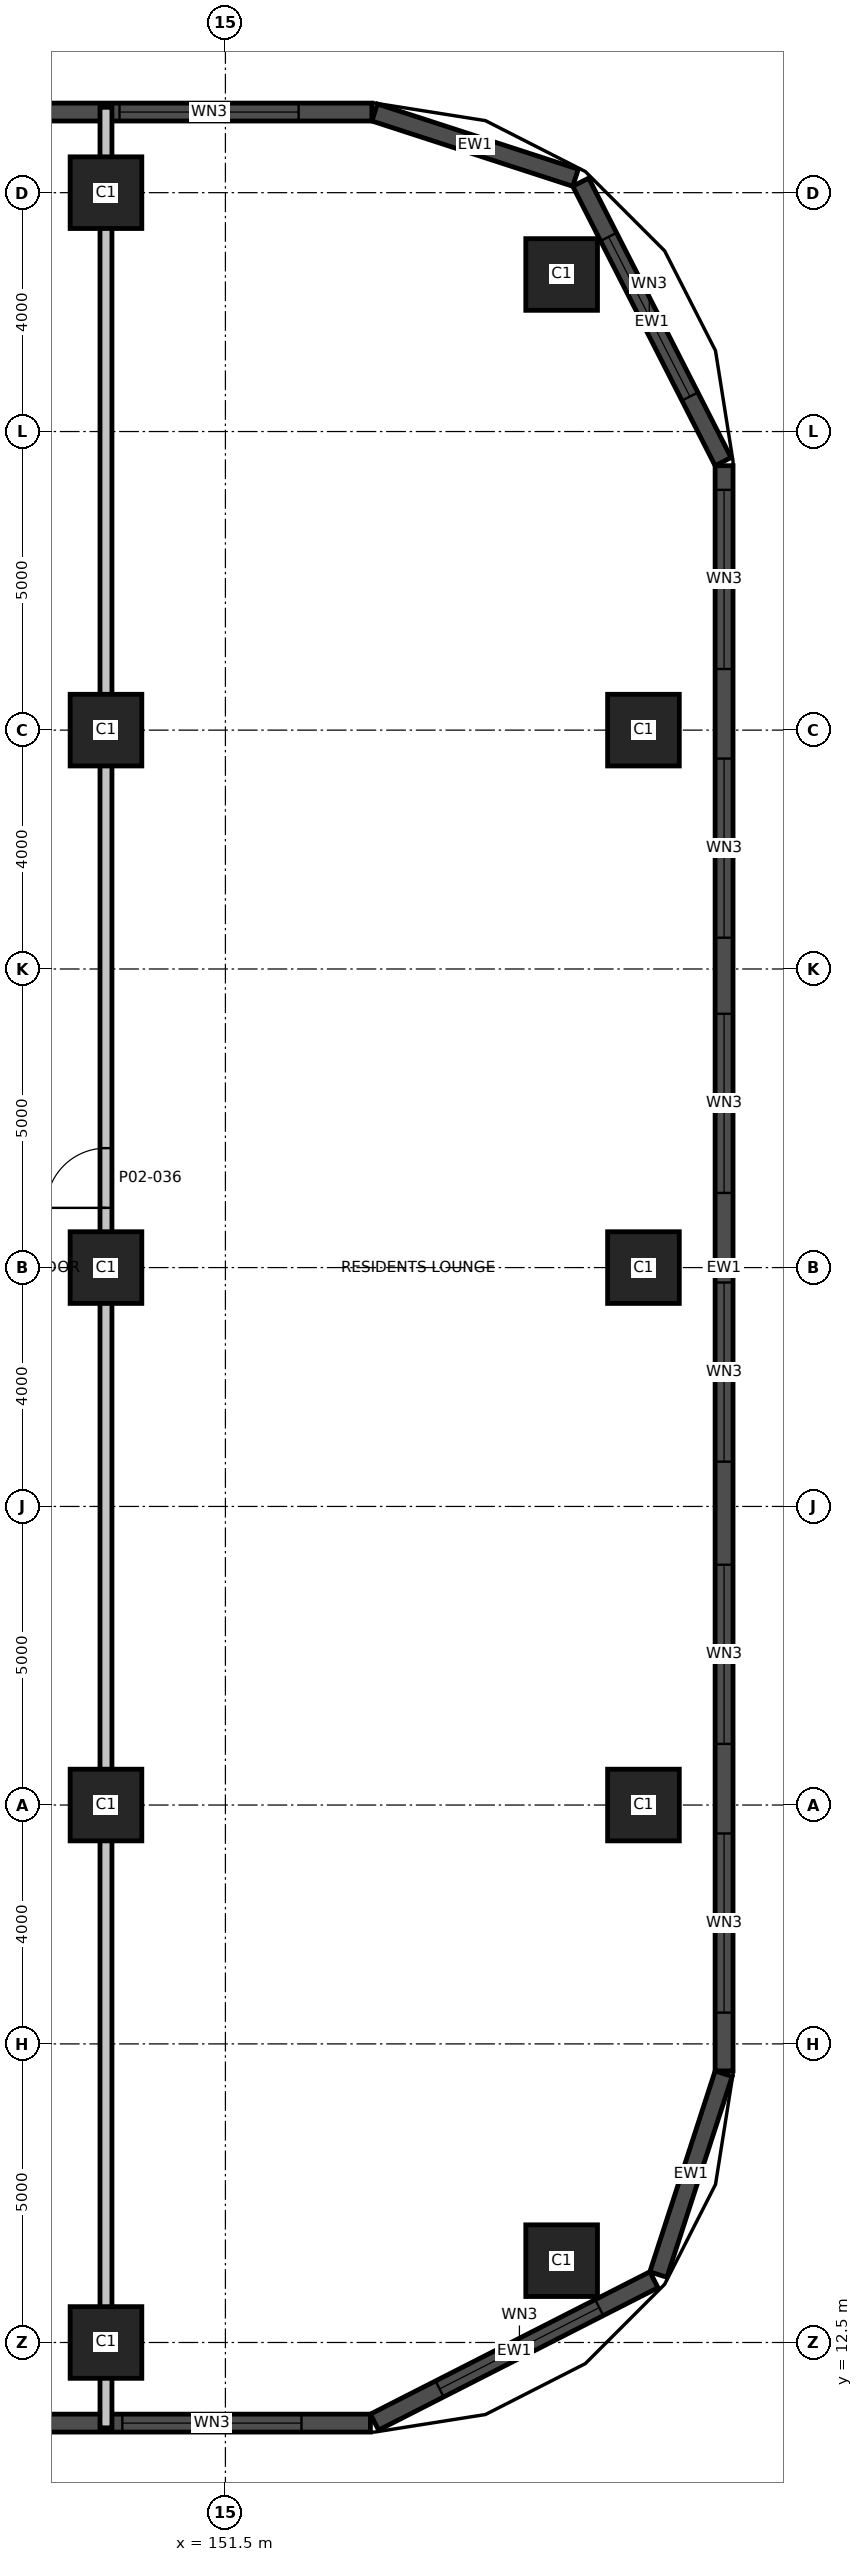
"""IFC4 building model, lengths in metres.
Left out: names, types, materials, properties, quantities, classifications, styles, units other than length and angle.
Written with IfcOpenShell. Run it as: python <this file> out.ifc"""

import sys

from ifc_helpers import new_model, si_unit, direction, frame, frame_2d, origin, origin_2d, place, context, subcontext, project, spatial, rectangle, extrude, element, fill, save


model = new_model("IFC4")
c1 = context("Model", 3, precision=1e-05, world=origin(), true_north=direction((0.0, 1.0)))
c2 = subcontext(c1, "Body", "Model", "MODEL_VIEW")
j1 = project(units=[si_unit("LENGTHUNIT", "METRE"), si_unit("PLANEANGLEUNIT", "RADIAN")], contexts=[c1])
p1 = place(None, origin())
s1 = spatial("IfcSite", under=j1, at=p1, CompositionType="ELEMENT")
p2 = place(p1, origin())
s2 = spatial("IfcBuilding", under=s1, at=p2, CompositionType="ELEMENT")
p3 = place(p2, frame((0.0, 0.0, 13.5)))
s3 = spatial("IfcBuildingStorey", under=s2, at=p3, CompositionType="ELEMENT", Elevation=13.5)
for number, where, z_axis, x_axis in (
    (1, (149.5, 12.5, 0.0), (0.0, 0.0, 1.0), (1.0, 0.0, 0.0)),
    (2, (157.13, 13.87, 0.0), (0.0, 0.0, 1.0), (1.0, 0.0, 0.0)),
    (3, (149.5, 21.5, 0.0), (0.0, 0.0, 1.0), (1.0, 0.0, 0.0)),
    (4, (158.5, 21.5, 0.0), (0.0, 0.0, 1.0), (1.0, 0.0, 0.0)),
    (5, (149.5, 30.5, 0.0), (0.0, 0.0, 1.0), (1.0, 0.0, 0.0)),
    (6, (158.5, 30.5, 0.0), (0.0, 0.0, 1.0), (1.0, 0.0, 0.0)),
    (7, (149.5, 39.5, 0.0), (0.0, 0.0, 1.0), (1.0, 0.0, 0.0)),
    (8, (158.5, 39.5, 0.0), (0.0, 0.0, 1.0), (1.0, 0.0, 0.0)),
    (9, (157.13, 47.13, 0.0), (0.0, 0.0, 1.0), (1.0, 0.0, 0.0)),
    (10, (149.5, 48.5, 0.0), (0.0, 0.0, 1.0), (1.0, 0.0, 0.0)),
):
    element("IfcColumn", number, at=place(p3, frame(where, z_axis=z_axis, x_axis=x_axis)), inside=s3, PredefinedType="COLUMN", context=c2, shape_type="SweptSolid", body=[
        extrude(rectangle(XDim=1.2, YDim=1.2, at=origin_2d()), origin(), (0.0, 0.0, 1.0), 5.0),
    ])
p4 = place(p3, frame((118.048, 11.15, 0.0), z_axis=(0.0, 0.0, 1.0), x_axis=(1.0, 0.0, 0.0)))
e11 = element("IfcWall", 11, at=p4, inside=s3, PredefinedType="SOLIDWALL", context=c2, shape_type="SweptSolid", body=[
    extrude(rectangle(XDim=35.88, YDim=0.3, at=frame_2d((17.94, 0.0))), origin(), (0.0, 0.0, 1.0), 4.7),
])
p5 = place(p4, frame((4.202, 0.0, 0.9)))
e12 = element("IfcOpeningElement", 12, at=p5, cuts=e11, PredefinedType="OPENING", context=c2, shape_type="SweptSolid", body=[
    extrude(rectangle(XDim=3.0, YDim=2.4, at=frame_2d((1.5, 1.2))), frame((0.0, 0.16, 0.0), z_axis=(0.0, -1.0, 0.0), x_axis=(1.0, 0.0, 0.0)), (0.0, 0.0, 1.0), 0.32),
])
p6 = place(p4, frame((8.702, 0.0, 0.9)))
e13 = element("IfcOpeningElement", 13, at=p6, cuts=e11, PredefinedType="OPENING", context=c2, shape_type="SweptSolid", body=[
    extrude(rectangle(XDim=3.0, YDim=2.4, at=frame_2d((1.5, 1.2))), frame((0.0, 0.16, 0.0), z_axis=(0.0, -1.0, 0.0), x_axis=(1.0, 0.0, 0.0)), (0.0, 0.0, 1.0), 0.32),
])
p7 = place(p4, frame((13.202, 0.0, 0.9)))
e14 = element("IfcOpeningElement", 14, at=p7, cuts=e11, PredefinedType="OPENING", context=c2, shape_type="SweptSolid", body=[
    extrude(rectangle(XDim=3.0, YDim=2.4, at=frame_2d((1.5, 1.2))), frame((0.0, 0.16, 0.0), z_axis=(0.0, -1.0, 0.0), x_axis=(1.0, 0.0, 0.0)), (0.0, 0.0, 1.0), 0.32),
])
p8 = place(p4, frame((22.202, 0.0, 0.9)))
e15 = element("IfcOpeningElement", 15, at=p8, cuts=e11, PredefinedType="OPENING", context=c2, shape_type="SweptSolid", body=[
    extrude(rectangle(XDim=3.0, YDim=2.4, at=frame_2d((1.5, 1.2))), frame((0.0, 0.16, 0.0), z_axis=(0.0, -1.0, 0.0), x_axis=(1.0, 0.0, 0.0)), (0.0, 0.0, 1.0), 0.32),
])
p9 = place(p4, frame((31.726, 0.0, 0.9)))
e16 = element("IfcOpeningElement", 16, at=p9, cuts=e11, PredefinedType="OPENING", context=c2, shape_type="SweptSolid", body=[
    extrude(rectangle(XDim=3.0, YDim=2.4, at=frame_2d((1.5, 1.2))), frame((0.0, 0.16, 0.0), z_axis=(0.0, -1.0, 0.0), x_axis=(1.0, 0.0, 0.0)), (0.0, 0.0, 1.0), 0.32),
])
p10 = place(p3, frame((153.996, 11.166, 0.0), z_axis=(0.0, 0.0, 1.0), x_axis=(0.890998339455, 0.454006562826, 0.0)))
e17 = element("IfcWall", 17, at=p10, inside=s3, PredefinedType="SOLIDWALL", context=c2, shape_type="SweptSolid", body=[
    extrude(rectangle(XDim=5.252, YDim=0.3, at=frame_2d((2.626, 0.0))), origin(), (0.0, 0.0, 1.0), 4.7),
])
p11 = place(p10, frame((1.224, 0.0, 0.9)))
e18 = element("IfcOpeningElement", 18, at=p11, cuts=e17, PredefinedType="OPENING", context=c2, shape_type="SweptSolid", body=[
    extrude(rectangle(XDim=3.0, YDim=2.4, at=frame_2d((1.5, 1.2))), frame((0.0, 0.16, 0.0), z_axis=(0.0, -1.0, 0.0), x_axis=(1.0, 0.0, 0.0)), (0.0, 0.0, 1.0), 0.32),
])
p12 = place(p3, frame((158.75, 13.638, 0.0), z_axis=(0.0, 0.0, 1.0), x_axis=(0.309073584194, 0.951038127287, 0.0)))
e19 = element("IfcWall", 19, at=p12, inside=s3, PredefinedType="SOLIDWALL", context=c2, shape_type="SweptSolid", body=[
    extrude(rectangle(XDim=3.536, YDim=0.3, at=frame_2d((1.768, 0.0))), origin(), (0.0, 0.0, 1.0), 4.7),
])
p13 = place(p3, frame((159.85, 17.048, 0.0), z_axis=(0.0, 0.0, 1.0), x_axis=(0.0, 1.0, 0.0)))
e20 = element("IfcWall", 20, at=p13, inside=s3, PredefinedType="SOLIDWALL", context=c2, shape_type="SweptSolid", body=[
    extrude(rectangle(XDim=26.88, YDim=0.3, at=frame_2d((13.44, 0.0))), origin(), (0.0, 0.0, 1.0), 4.7),
])
p14 = place(p13, frame((0.976, 0.0, 0.9)))
e21 = element("IfcOpeningElement", 21, at=p14, cuts=e20, PredefinedType="OPENING", context=c2, shape_type="SweptSolid", body=[
    extrude(rectangle(XDim=3.0, YDim=2.4, at=frame_2d((1.5, 1.2))), frame((0.0, 0.16, 0.0), z_axis=(0.0, -1.0, 0.0), x_axis=(1.0, 0.0, 0.0)), (0.0, 0.0, 1.0), 0.32),
])
p15 = place(p13, frame((5.476, 0.0, 0.9)))
e22 = element("IfcOpeningElement", 22, at=p15, cuts=e20, PredefinedType="OPENING", context=c2, shape_type="SweptSolid", body=[
    extrude(rectangle(XDim=3.0, YDim=2.4, at=frame_2d((1.5, 1.2))), frame((0.0, 0.16, 0.0), z_axis=(0.0, -1.0, 0.0), x_axis=(1.0, 0.0, 0.0)), (0.0, 0.0, 1.0), 0.32),
])
p16 = place(p13, frame((10.202, 0.0, 0.9)))
e23 = element("IfcOpeningElement", 23, at=p16, cuts=e20, PredefinedType="OPENING", context=c2, shape_type="SweptSolid", body=[
    extrude(rectangle(XDim=3.0, YDim=2.4, at=frame_2d((1.5, 1.2))), frame((0.0, 0.16, 0.0), z_axis=(0.0, -1.0, 0.0), x_axis=(1.0, 0.0, 0.0)), (0.0, 0.0, 1.0), 0.32),
])
p17 = place(p13, frame((14.702, 0.0, 0.9)))
e24 = element("IfcOpeningElement", 24, at=p17, cuts=e20, PredefinedType="OPENING", context=c2, shape_type="SweptSolid", body=[
    extrude(rectangle(XDim=3.0, YDim=2.4, at=frame_2d((1.5, 1.2))), frame((0.0, 0.16, 0.0), z_axis=(0.0, -1.0, 0.0), x_axis=(1.0, 0.0, 0.0)), (0.0, 0.0, 1.0), 0.32),
])
p18 = place(p13, frame((18.976, 0.0, 0.9)))
e25 = element("IfcOpeningElement", 25, at=p18, cuts=e20, PredefinedType="OPENING", context=c2, shape_type="SweptSolid", body=[
    extrude(rectangle(XDim=3.0, YDim=2.4, at=frame_2d((1.5, 1.2))), frame((0.0, 0.16, 0.0), z_axis=(0.0, -1.0, 0.0), x_axis=(1.0, 0.0, 0.0)), (0.0, 0.0, 1.0), 0.32),
])
p19 = place(p13, frame((23.476, 0.0, 0.9)))
e26 = element("IfcOpeningElement", 26, at=p19, cuts=e20, PredefinedType="OPENING", context=c2, shape_type="SweptSolid", body=[
    extrude(rectangle(XDim=3.0, YDim=2.4, at=frame_2d((1.5, 1.2))), frame((0.0, 0.16, 0.0), z_axis=(0.0, -1.0, 0.0), x_axis=(1.0, 0.0, 0.0)), (0.0, 0.0, 1.0), 0.32),
])
p20 = place(p3, frame((159.834, 43.996, 0.0), z_axis=(0.0, 0.0, 1.0), x_axis=(-0.454006562826, 0.890998339455, 0.0)))
e27 = element("IfcWall", 27, at=p20, inside=s3, PredefinedType="SOLIDWALL", context=c2, shape_type="SweptSolid", body=[
    extrude(rectangle(XDim=5.252, YDim=0.3, at=frame_2d((2.626, 0.0))), origin(), (0.0, 0.0, 1.0), 4.7),
])
p21 = place(p20, frame((1.224, 0.0, 0.9)))
e28 = element("IfcOpeningElement", 28, at=p21, cuts=e27, PredefinedType="OPENING", context=c2, shape_type="SweptSolid", body=[
    extrude(rectangle(XDim=3.0, YDim=2.4, at=frame_2d((1.5, 1.2))), frame((0.0, 0.16, 0.0), z_axis=(0.0, -1.0, 0.0), x_axis=(1.0, 0.0, 0.0)), (0.0, 0.0, 1.0), 0.32),
])
p22 = place(p3, frame((157.362, 48.75, 0.0), z_axis=(0.0, 0.0, 1.0), x_axis=(-0.951038127287, 0.309073584194, 0.0)))
e29 = element("IfcWall", 29, at=p22, inside=s3, PredefinedType="SOLIDWALL", context=c2, shape_type="SweptSolid", body=[
    extrude(rectangle(XDim=3.536, YDim=0.3, at=frame_2d((1.768, 0.0))), origin(), (0.0, 0.0, 1.0), 4.7),
])
p23 = place(p3, frame((153.952, 49.85, 0.0), z_axis=(0.0, 0.0, 1.0), x_axis=(-1.0, 0.0, 0.0)))
e30 = element("IfcWall", 30, at=p23, inside=s3, PredefinedType="SOLIDWALL", context=c2, shape_type="SweptSolid", body=[
    extrude(rectangle(XDim=35.88, YDim=0.3, at=frame_2d((17.94, 0.0))), origin(), (0.0, 0.0, 1.0), 4.7),
])
p24 = place(p23, frame((1.226, 0.0, 0.9)))
e31 = element("IfcOpeningElement", 31, at=p24, cuts=e30, PredefinedType="OPENING", context=c2, shape_type="SweptSolid", body=[
    extrude(rectangle(XDim=3.0, YDim=2.4, at=frame_2d((1.5, 1.2))), frame((0.0, 0.16, 0.0), z_axis=(0.0, -1.0, 0.0), x_axis=(1.0, 0.0, 0.0)), (0.0, 0.0, 1.0), 0.32),
])
p25 = place(p23, frame((10.702, 0.0, 0.9)))
e32 = element("IfcOpeningElement", 32, at=p25, cuts=e30, PredefinedType="OPENING", context=c2, shape_type="SweptSolid", body=[
    extrude(rectangle(XDim=3.0, YDim=2.4, at=frame_2d((1.5, 1.2))), frame((0.0, 0.16, 0.0), z_axis=(0.0, -1.0, 0.0), x_axis=(1.0, 0.0, 0.0)), (0.0, 0.0, 1.0), 0.32),
])
p26 = place(p23, frame((15.202, 0.0, 0.9)))
e33 = element("IfcOpeningElement", 33, at=p26, cuts=e30, PredefinedType="OPENING", context=c2, shape_type="SweptSolid", body=[
    extrude(rectangle(XDim=3.0, YDim=2.4, at=frame_2d((1.5, 1.2))), frame((0.0, 0.16, 0.0), z_axis=(0.0, -1.0, 0.0), x_axis=(1.0, 0.0, 0.0)), (0.0, 0.0, 1.0), 0.32),
])
p27 = place(p23, frame((19.702, 0.0, 0.9)))
e34 = element("IfcOpeningElement", 34, at=p27, cuts=e30, PredefinedType="OPENING", context=c2, shape_type="SweptSolid", body=[
    extrude(rectangle(XDim=3.0, YDim=2.4, at=frame_2d((1.5, 1.2))), frame((0.0, 0.16, 0.0), z_axis=(0.0, -1.0, 0.0), x_axis=(1.0, 0.0, 0.0)), (0.0, 0.0, 1.0), 0.32),
])
p28 = place(p23, frame((24.202, 0.0, 0.9)))
e35 = element("IfcOpeningElement", 35, at=p28, cuts=e30, PredefinedType="OPENING", context=c2, shape_type="SweptSolid", body=[
    extrude(rectangle(XDim=3.0, YDim=2.4, at=frame_2d((1.5, 1.2))), frame((0.0, 0.16, 0.0), z_axis=(0.0, -1.0, 0.0), x_axis=(1.0, 0.0, 0.0)), (0.0, 0.0, 1.0), 0.32),
])
p29 = place(p23, frame((28.702, 0.0, 0.9)))
e36 = element("IfcOpeningElement", 36, at=p29, cuts=e30, PredefinedType="OPENING", context=c2, shape_type="SweptSolid", body=[
    extrude(rectangle(XDim=3.0, YDim=2.4, at=frame_2d((1.5, 1.2))), frame((0.0, 0.16, 0.0), z_axis=(0.0, -1.0, 0.0), x_axis=(1.0, 0.0, 0.0)), (0.0, 0.0, 1.0), 0.32),
])
p30 = place(p3, frame((149.5, 11.07, 0.0), z_axis=(0.0, 0.0, 1.0), x_axis=(0.0, 1.0, 0.0)))
e37 = element("IfcWall", 37, at=p30, inside=s3, PredefinedType="PARTITIONING", context=c2, shape_type="SweptSolid", body=[
    extrude(rectangle(XDim=38.86, YDim=0.2, at=frame_2d((19.43, 0.0))), origin(), (0.0, 0.0, 1.0), 4.7),
])
p31 = place(p30, frame((20.43, 0.0, 0.0)))
e38 = element("IfcOpeningElement", 38, at=p31, cuts=e37, PredefinedType="OPENING", context=c2, shape_type="SweptSolid", body=[
    extrude(rectangle(XDim=1.0, YDim=2.1, at=frame_2d((0.5, 1.05))), frame((0.0, 0.11, 0.0), z_axis=(0.0, -1.0, 0.0), x_axis=(1.0, 0.0, 0.0)), (0.0, 0.0, 1.0), 0.22),
])
p32 = place(p9, origin())
e39 = element("IfcWindow", 39, at=p32, inside=s3, PartitioningType="SINGLE_PANEL", PredefinedType="WINDOW", context=c2, shape_type="SweptSolid", body=[
    extrude(rectangle(XDim=3.0, YDim=2.4, at=frame_2d((1.5, 1.2))), frame((0.0, 0.03, 0.0), z_axis=(0.0, -1.0, 0.0), x_axis=(1.0, 0.0, 0.0)), (0.0, 0.0, 1.0), 0.06),
])
fill(e16, e39)
p33 = place(p11, origin())
e40 = element("IfcWindow", 40, at=p33, inside=s3, PartitioningType="SINGLE_PANEL", PredefinedType="WINDOW", context=c2, shape_type="SweptSolid", body=[
    extrude(rectangle(XDim=3.0, YDim=2.4, at=frame_2d((1.5, 1.2))), frame((0.0, 0.03, 0.0), z_axis=(0.0, -1.0, 0.0), x_axis=(1.0, 0.0, 0.0)), (0.0, 0.0, 1.0), 0.06),
])
fill(e18, e40)
p34 = place(p14, origin())
e41 = element("IfcWindow", 41, at=p34, inside=s3, PartitioningType="SINGLE_PANEL", PredefinedType="WINDOW", context=c2, shape_type="SweptSolid", body=[
    extrude(rectangle(XDim=3.0, YDim=2.4, at=frame_2d((1.5, 1.2))), frame((0.0, 0.03, 0.0), z_axis=(0.0, -1.0, 0.0), x_axis=(1.0, 0.0, 0.0)), (0.0, 0.0, 1.0), 0.06),
])
fill(e21, e41)
p35 = place(p15, origin())
e42 = element("IfcWindow", 42, at=p35, inside=s3, PartitioningType="SINGLE_PANEL", PredefinedType="WINDOW", context=c2, shape_type="SweptSolid", body=[
    extrude(rectangle(XDim=3.0, YDim=2.4, at=frame_2d((1.5, 1.2))), frame((0.0, 0.03, 0.0), z_axis=(0.0, -1.0, 0.0), x_axis=(1.0, 0.0, 0.0)), (0.0, 0.0, 1.0), 0.06),
])
fill(e22, e42)
p36 = place(p16, origin())
e43 = element("IfcWindow", 43, at=p36, inside=s3, PartitioningType="SINGLE_PANEL", PredefinedType="WINDOW", context=c2, shape_type="SweptSolid", body=[
    extrude(rectangle(XDim=3.0, YDim=2.4, at=frame_2d((1.5, 1.2))), frame((0.0, 0.03, 0.0), z_axis=(0.0, -1.0, 0.0), x_axis=(1.0, 0.0, 0.0)), (0.0, 0.0, 1.0), 0.06),
])
fill(e23, e43)
p37 = place(p17, origin())
e44 = element("IfcWindow", 44, at=p37, inside=s3, PartitioningType="SINGLE_PANEL", PredefinedType="WINDOW", context=c2, shape_type="SweptSolid", body=[
    extrude(rectangle(XDim=3.0, YDim=2.4, at=frame_2d((1.5, 1.2))), frame((0.0, 0.03, 0.0), z_axis=(0.0, -1.0, 0.0), x_axis=(1.0, 0.0, 0.0)), (0.0, 0.0, 1.0), 0.06),
])
fill(e24, e44)
p38 = place(p18, origin())
e45 = element("IfcWindow", 45, at=p38, inside=s3, PartitioningType="SINGLE_PANEL", PredefinedType="WINDOW", context=c2, shape_type="SweptSolid", body=[
    extrude(rectangle(XDim=3.0, YDim=2.4, at=frame_2d((1.5, 1.2))), frame((0.0, 0.03, 0.0), z_axis=(0.0, -1.0, 0.0), x_axis=(1.0, 0.0, 0.0)), (0.0, 0.0, 1.0), 0.06),
])
fill(e25, e45)
p39 = place(p19, origin())
e46 = element("IfcWindow", 46, at=p39, inside=s3, PartitioningType="SINGLE_PANEL", PredefinedType="WINDOW", context=c2, shape_type="SweptSolid", body=[
    extrude(rectangle(XDim=3.0, YDim=2.4, at=frame_2d((1.5, 1.2))), frame((0.0, 0.03, 0.0), z_axis=(0.0, -1.0, 0.0), x_axis=(1.0, 0.0, 0.0)), (0.0, 0.0, 1.0), 0.06),
])
fill(e26, e46)
p40 = place(p21, origin())
e47 = element("IfcWindow", 47, at=p40, inside=s3, PartitioningType="SINGLE_PANEL", PredefinedType="WINDOW", context=c2, shape_type="SweptSolid", body=[
    extrude(rectangle(XDim=3.0, YDim=2.4, at=frame_2d((1.5, 1.2))), frame((0.0, 0.03, 0.0), z_axis=(0.0, -1.0, 0.0), x_axis=(1.0, 0.0, 0.0)), (0.0, 0.0, 1.0), 0.06),
])
fill(e28, e47)
p41 = place(p24, origin())
e48 = element("IfcWindow", 48, at=p41, inside=s3, PartitioningType="SINGLE_PANEL", PredefinedType="WINDOW", context=c2, shape_type="SweptSolid", body=[
    extrude(rectangle(XDim=3.0, YDim=2.4, at=frame_2d((1.5, 1.2))), frame((0.0, 0.03, 0.0), z_axis=(0.0, -1.0, 0.0), x_axis=(1.0, 0.0, 0.0)), (0.0, 0.0, 1.0), 0.06),
])
fill(e31, e48)
p42 = place(p31, origin())
e49 = element("IfcDoor", 49, at=p42, inside=s3, OperationType="SINGLE_SWING_RIGHT", PredefinedType="DOOR", context=c2, shape_type="SweptSolid", body=[
    extrude(rectangle(XDim=1.0, YDim=2.1, at=frame_2d((0.5, 1.05))), frame((0.0, 0.025, 0.0), z_axis=(0.0, -1.0, 0.0), x_axis=(1.0, 0.0, 0.0)), (0.0, 0.0, 1.0), 0.05),
])
fill(e38, e49)
save(model, sys.argv[1])
